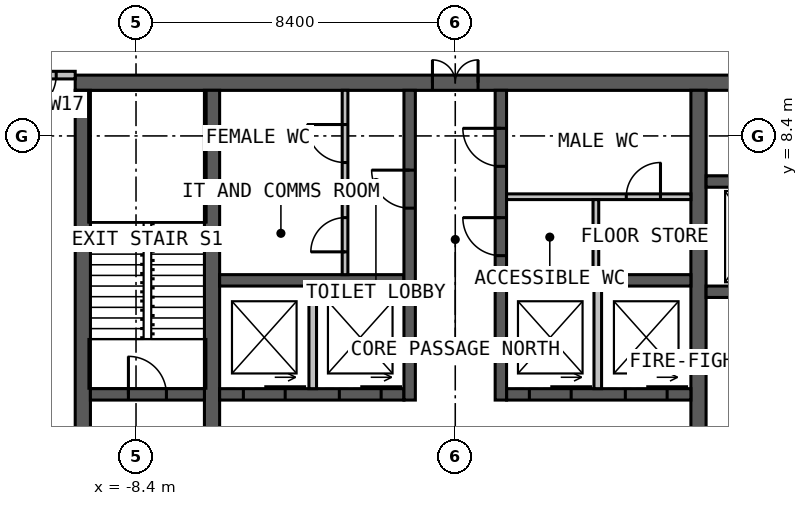
"""IFC4 building model, lengths in metres.
Left out: names, types, materials, properties, quantities, classifications, styles, units other than length and angle.
Written with IfcOpenShell. Run it as: python <this file> out.ifc"""

import sys

from ifc_helpers import new_model, si_unit, direction, frame, frame_2d, origin, place, context, subcontext, project, spatial, rectangle, extrude, element, fill, save


model = new_model("IFC4")
c1 = context("Model", 3, precision=1e-05, world=origin(), true_north=direction((0.0, 1.0)))
c2 = subcontext(c1, "Body", "Model", "MODEL_VIEW")
j1 = project(units=[si_unit("LENGTHUNIT", "METRE"), si_unit("PLANEANGLEUNIT", "RADIAN")], contexts=[c1])
p1 = place(None, origin())
s1 = spatial("IfcSite", under=j1, at=p1, CompositionType="ELEMENT")
p2 = place(p1, origin())
s2 = spatial("IfcBuilding", under=s1, at=p2, CompositionType="ELEMENT")
p3 = place(p2, frame((0.0, 0.0, 228.0)))
s3 = spatial("IfcBuildingStorey", under=s2, at=p3, CompositionType="ELEMENT", Elevation=228.0)
p4 = place(p3, frame((-10.0, 9.8, 0.0), z_axis=(0.0, 0.0, 1.0), x_axis=(1.0, 0.0, 0.0)))
e1 = element("IfcWall", 1, at=p4, inside=s3, PredefinedType="SOLIDWALL", context=c2, shape_type="SweptSolid", body=[
    extrude(rectangle(XDim=20.0, YDim=0.4, at=frame_2d((10.0, 0.0))), origin(), (0.0, 0.0, 1.0), 4.0),
])
p5 = place(p4, frame((9.4, 0.0, 0.0)))
e2 = element("IfcOpeningElement", 2, at=p5, cuts=e1, PredefinedType="OPENING", context=c2, shape_type="SweptSolid", body=[
    extrude(rectangle(XDim=1.2, YDim=2.2, at=frame_2d((0.6, 1.1))), frame((0.0, 0.21, 0.0), z_axis=(0.0, -1.0, 0.0), x_axis=(1.0, 0.0, 0.0)), (0.0, 0.0, 1.0), 0.42),
])
p6 = place(p3, frame((-9.8, 9.6, 0.0), z_axis=(0.0, 0.0, 1.0), x_axis=(0.0, -1.0, 0.0)))
e3 = element("IfcWall", 3, at=p6, inside=s3, PredefinedType="SOLIDWALL", context=c2, shape_type="SweptSolid", body=[
    extrude(rectangle(XDim=19.2, YDim=0.4, at=frame_2d((9.6, 0.0))), origin(), (0.0, 0.0, 1.0), 4.0),
])
p7 = place(p3, frame((-6.4, -9.6, 0.0), z_axis=(0.0, 0.0, 1.0), x_axis=(0.0, 1.0, 0.0)))
e4 = element("IfcWall", 4, at=p7, inside=s3, PredefinedType="SOLIDWALL", context=c2, shape_type="SweptSolid", body=[
    extrude(rectangle(XDim=19.2, YDim=0.4, at=frame_2d((9.6, 0.0))), origin(), (0.0, 0.0, 1.0), 4.0),
])
p8 = place(p7, frame((9.1, 0.0, 0.0)))
e5 = element("IfcOpeningElement", 5, at=p8, cuts=e4, PredefinedType="OPENING", context=c2, shape_type="SweptSolid", body=[
    extrude(rectangle(XDim=1.0, YDim=2.2, at=frame_2d((0.5, 1.1))), frame((0.0, 0.21, 0.0), z_axis=(0.0, -1.0, 0.0), x_axis=(1.0, 0.0, 0.0)), (0.0, 0.0, 1.0), 0.42),
])
p9 = place(p3, frame((6.4, 9.6, 0.0), z_axis=(0.0, 0.0, 1.0), x_axis=(0.0, -1.0, 0.0)))
e6 = element("IfcWall", 6, at=p9, inside=s3, PredefinedType="SOLIDWALL", context=c2, shape_type="SweptSolid", body=[
    extrude(rectangle(XDim=19.2, YDim=0.4, at=frame_2d((9.6, 0.0))), origin(), (0.0, 0.0, 1.0), 4.0),
])
p10 = place(p9, frame((9.1, 0.0, 0.0)))
e7 = element("IfcOpeningElement", 7, at=p10, cuts=e6, PredefinedType="OPENING", context=c2, shape_type="SweptSolid", body=[
    extrude(rectangle(XDim=1.0, YDim=2.2, at=frame_2d((0.5, 1.1))), frame((0.0, 0.21, 0.0), z_axis=(0.0, -1.0, 0.0), x_axis=(1.0, 0.0, 0.0)), (0.0, 0.0, 1.0), 0.42),
])
p11 = place(p3, frame((-6.2, 1.6, 0.0), z_axis=(0.0, 0.0, 1.0), x_axis=(1.0, 0.0, 0.0)))
e8 = element("IfcWall", 8, at=p11, inside=s3, PredefinedType="SOLIDWALL", context=c2, shape_type="SweptSolid", body=[
    extrude(rectangle(XDim=4.85, YDim=0.3, at=frame_2d((2.425, 0.0))), origin(), (0.0, 0.0, 1.0), 4.0),
])
p12 = place(p11, frame((0.625, 0.0, 0.0)))
e9 = element("IfcOpeningElement", 9, at=p12, cuts=e8, PredefinedType="OPENING", context=c2, shape_type="SweptSolid", body=[
    extrude(rectangle(XDim=1.1, YDim=2.2, at=frame_2d((0.55, 1.1))), frame((0.0, 0.16, 0.0), z_axis=(0.0, -1.0, 0.0), x_axis=(1.0, 0.0, 0.0)), (0.0, 0.0, 1.0), 0.32),
])
p13 = place(p11, frame((3.15, 0.0, 0.0)))
e10 = element("IfcOpeningElement", 10, at=p13, cuts=e8, PredefinedType="OPENING", context=c2, shape_type="SweptSolid", body=[
    extrude(rectangle(XDim=1.1, YDim=2.2, at=frame_2d((0.55, 1.1))), frame((0.0, 0.16, 0.0), z_axis=(0.0, -1.0, 0.0), x_axis=(1.0, 0.0, 0.0)), (0.0, 0.0, 1.0), 0.32),
])
p14 = place(p3, frame((1.35, 1.6, 0.0), z_axis=(0.0, 0.0, 1.0), x_axis=(1.0, 0.0, 0.0)))
e11 = element("IfcWall", 11, at=p14, inside=s3, PredefinedType="SOLIDWALL", context=c2, shape_type="SweptSolid", body=[
    extrude(rectangle(XDim=4.85, YDim=0.3, at=frame_2d((2.425, 0.0))), origin(), (0.0, 0.0, 1.0), 4.0),
])
p15 = place(p14, frame((0.6, 0.0, 0.0)))
e12 = element("IfcOpeningElement", 12, at=p15, cuts=e11, PredefinedType="OPENING", context=c2, shape_type="SweptSolid", body=[
    extrude(rectangle(XDim=1.1, YDim=2.2, at=frame_2d((0.55, 1.1))), frame((0.0, 0.16, 0.0), z_axis=(0.0, -1.0, 0.0), x_axis=(1.0, 0.0, 0.0)), (0.0, 0.0, 1.0), 0.32),
])
p16 = place(p14, frame((3.125, 0.0, 0.0)))
e13 = element("IfcOpeningElement", 13, at=p16, cuts=e11, PredefinedType="OPENING", context=c2, shape_type="SweptSolid", body=[
    extrude(rectangle(XDim=1.1, YDim=2.2, at=frame_2d((0.55, 1.1))), frame((0.0, 0.16, 0.0), z_axis=(0.0, -1.0, 0.0), x_axis=(1.0, 0.0, 0.0)), (0.0, 0.0, 1.0), 0.32),
])
for number, where, z_axis, x_axis in (
    (14, (-6.2, 4.6, 0.0), (0.0, 0.0, 1.0), (1.0, 0.0, 0.0)),
    (15, (1.35, 4.6, 0.0), (0.0, 0.0, 1.0), (1.0, 0.0, 0.0)),
):
    element("IfcWall", number, at=place(p3, frame(where, z_axis=z_axis, x_axis=x_axis)), inside=s3, PredefinedType="SOLIDWALL", context=c2, shape_type="SweptSolid", body=[
        extrude(rectangle(XDim=4.85, YDim=0.3, at=frame_2d((2.425, 0.0))), origin(), (0.0, 0.0, 1.0), 4.0),
    ])
p17 = place(p3, frame((-1.2, 1.45, 0.0), z_axis=(0.0, 0.0, 1.0), x_axis=(0.0, 1.0, 0.0)))
e16 = element("IfcWall", 16, at=p17, inside=s3, PredefinedType="SOLIDWALL", context=c2, shape_type="SweptSolid", body=[
    extrude(rectangle(XDim=8.15, YDim=0.3, at=frame_2d((4.075, 0.0))), origin(), (0.0, 0.0, 1.0), 4.0),
])
p18 = place(p17, frame((5.05, 0.0, 0.0)))
e17 = element("IfcOpeningElement", 17, at=p18, cuts=e16, PredefinedType="OPENING", context=c2, shape_type="SweptSolid", body=[
    extrude(rectangle(XDim=1.0, YDim=2.2, at=frame_2d((0.5, 1.1))), frame((0.0, 0.16, 0.0), z_axis=(0.0, -1.0, 0.0), x_axis=(1.0, 0.0, 0.0)), (0.0, 0.0, 1.0), 0.32),
])
p19 = place(p3, frame((1.2, 1.45, 0.0), z_axis=(0.0, 0.0, 1.0), x_axis=(0.0, 1.0, 0.0)))
e18 = element("IfcWall", 18, at=p19, inside=s3, PredefinedType="SOLIDWALL", context=c2, shape_type="SweptSolid", body=[
    extrude(rectangle(XDim=8.15, YDim=0.3, at=frame_2d((4.075, 0.0))), origin(), (0.0, 0.0, 1.0), 4.0),
])
p20 = place(p19, frame((3.8, 0.0, 0.0)))
e19 = element("IfcOpeningElement", 19, at=p20, cuts=e18, PredefinedType="OPENING", context=c2, shape_type="SweptSolid", body=[
    extrude(rectangle(XDim=1.0, YDim=2.2, at=frame_2d((0.5, 1.1))), frame((0.0, 0.16, 0.0), z_axis=(0.0, -1.0, 0.0), x_axis=(1.0, 0.0, 0.0)), (0.0, 0.0, 1.0), 0.32),
])
p21 = place(p19, frame((6.15, 0.0, 0.0)))
e20 = element("IfcOpeningElement", 20, at=p21, cuts=e18, PredefinedType="OPENING", context=c2, shape_type="SweptSolid", body=[
    extrude(rectangle(XDim=1.0, YDim=2.2, at=frame_2d((0.5, 1.1))), frame((0.0, 0.16, 0.0), z_axis=(0.0, -1.0, 0.0), x_axis=(1.0, 0.0, 0.0)), (0.0, 0.0, 1.0), 0.32),
])
p22 = place(p3, frame((-9.6, 1.6, 0.0), z_axis=(0.0, 0.0, 1.0), x_axis=(1.0, 0.0, 0.0)))
e21 = element("IfcWall", 21, at=p22, inside=s3, PredefinedType="SOLIDWALL", context=c2, shape_type="SweptSolid", body=[
    extrude(rectangle(XDim=3.0, YDim=0.3, at=frame_2d((1.5, 0.0))), origin(), (0.0, 0.0, 1.0), 4.0),
])
p23 = place(p22, frame((1.0, 0.0, 0.0)))
e22 = element("IfcOpeningElement", 22, at=p23, cuts=e21, PredefinedType="OPENING", context=c2, shape_type="SweptSolid", body=[
    extrude(rectangle(XDim=1.0, YDim=2.2, at=frame_2d((0.5, 1.1))), frame((0.0, 0.16, 0.0), z_axis=(0.0, -1.0, 0.0), x_axis=(1.0, 0.0, 0.0)), (0.0, 0.0, 1.0), 0.32),
])
p24 = place(p3, frame((6.6, 4.3, 0.0), z_axis=(0.0, 0.0, 1.0), x_axis=(1.0, 0.0, 0.0)))
e23 = element("IfcWall", 23, at=p24, inside=s3, PredefinedType="SOLIDWALL", context=c2, shape_type="SweptSolid", body=[
    extrude(rectangle(XDim=3.0, YDim=0.3, at=frame_2d((1.5, 0.0))), origin(), (0.0, 0.0, 1.0), 4.0),
])
p25 = place(p24, frame((0.75, 0.0, 0.0)))
e24 = element("IfcOpeningElement", 24, at=p25, cuts=e23, PredefinedType="OPENING", context=c2, shape_type="SweptSolid", body=[
    extrude(rectangle(XDim=1.1, YDim=2.2, at=frame_2d((0.55, 1.1))), frame((0.0, 0.16, 0.0), z_axis=(0.0, -1.0, 0.0), x_axis=(1.0, 0.0, 0.0)), (0.0, 0.0, 1.0), 0.32),
])
p26 = place(p3, frame((6.6, 7.2, 0.0), z_axis=(0.0, 0.0, 1.0), x_axis=(1.0, 0.0, 0.0)))
e25 = element("IfcWall", 25, at=p26, inside=s3, PredefinedType="SOLIDWALL", context=c2, shape_type="SweptSolid", body=[
    extrude(rectangle(XDim=3.0, YDim=0.3, at=frame_2d((1.5, 0.0))), origin(), (0.0, 0.0, 1.0), 4.0),
])
for number, where, z_axis, x_axis in (
    (26, (-3.75, 1.75, 0.0), (0.0, 0.0, 1.0), (0.0, 1.0, 0.0)),
    (27, (3.75, 1.75, 0.0), (0.0, 0.0, 1.0), (0.0, 1.0, 0.0)),
):
    element("IfcWall", number, at=place(p3, frame(where, z_axis=z_axis, x_axis=x_axis)), inside=s3, PredefinedType="SOLIDWALL", context=c2, shape_type="SweptSolid", body=[
        extrude(rectangle(XDim=2.7, YDim=0.2, at=frame_2d((1.35, 0.0))), origin(), (0.0, 0.0, 1.0), 3.75),
    ])
p27 = place(p3, frame((1.35, 6.8, 0.0), z_axis=(0.0, 0.0, 1.0), x_axis=(1.0, 0.0, 0.0)))
e28 = element("IfcWall", 28, at=p27, inside=s3, PredefinedType="PARTITIONING", context=c2, shape_type="SweptSolid", body=[
    extrude(rectangle(XDim=4.85, YDim=0.15, at=frame_2d((2.425, 0.0))), origin(), (0.0, 0.0, 1.0), 3.75),
])
p28 = place(p27, frame((3.15, 0.0, 0.0)))
e29 = element("IfcOpeningElement", 29, at=p28, cuts=e28, PredefinedType="OPENING", context=c2, shape_type="SweptSolid", body=[
    extrude(rectangle(XDim=0.9, YDim=2.2, at=frame_2d((0.45, 1.1))), frame((0.0, 0.085, 0.0), z_axis=(0.0, -1.0, 0.0), x_axis=(1.0, 0.0, 0.0)), (0.0, 0.0, 1.0), 0.17),
])
p29 = place(p3, frame((3.7, 4.75, 0.0), z_axis=(0.0, 0.0, 1.0), x_axis=(0.0, 1.0, 0.0)))
e30 = element("IfcWall", 30, at=p29, inside=s3, PredefinedType="PARTITIONING", context=c2, shape_type="SweptSolid", body=[
    extrude(rectangle(XDim=1.975, YDim=0.15, at=frame_2d((0.988, 0.0))), origin(), (0.0, 0.0, 1.0), 3.75),
])
p30 = place(p3, frame((-2.9, 4.75, 0.0), z_axis=(0.0, 0.0, 1.0), x_axis=(0.0, 1.0, 0.0)))
e31 = element("IfcWall", 31, at=p30, inside=s3, PredefinedType="PARTITIONING", context=c2, shape_type="SweptSolid", body=[
    extrude(rectangle(XDim=4.85, YDim=0.15, at=frame_2d((2.425, 0.0))), origin(), (0.0, 0.0, 1.0), 3.75),
])
p31 = place(p30, frame((2.95, 0.0, 0.0)))
e32 = element("IfcOpeningElement", 32, at=p31, cuts=e31, PredefinedType="OPENING", context=c2, shape_type="SweptSolid", body=[
    extrude(rectangle(XDim=1.0, YDim=2.2, at=frame_2d((0.5, 1.1))), frame((0.0, 0.085, 0.0), z_axis=(0.0, -1.0, 0.0), x_axis=(1.0, 0.0, 0.0)), (0.0, 0.0, 1.0), 0.17),
])
p32 = place(p30, frame((0.6, 0.0, 0.0)))
e33 = element("IfcOpeningElement", 33, at=p32, cuts=e31, PredefinedType="OPENING", context=c2, shape_type="SweptSolid", body=[
    extrude(rectangle(XDim=0.9, YDim=2.2, at=frame_2d((0.45, 1.1))), frame((0.0, 0.085, 0.0), z_axis=(0.0, -1.0, 0.0), x_axis=(1.0, 0.0, 0.0)), (0.0, 0.0, 1.0), 0.17),
])
p33 = place(p3, frame((-6.2, 7.0, 0.0), z_axis=(0.0, 0.0, 1.0), x_axis=(1.0, 0.0, 0.0)))
e34 = element("IfcWall", 34, at=p33, inside=s3, PredefinedType="PARTITIONING", context=c2, shape_type="SweptSolid", body=[
    extrude(rectangle(XDim=3.225, YDim=0.15, at=frame_2d((1.612, 0.0))), origin(), (0.0, 0.0, 1.0), 3.75),
])
p34 = place(p3, frame((-10.0, 10.0, 0.0), z_axis=(0.0, 0.0, 1.0), x_axis=(-1.0, 0.0, 0.0)))
e35 = element("IfcWall", 35, at=p34, inside=s3, PredefinedType="PARTITIONING", context=c2, shape_type="SweptSolid", body=[
    extrude(rectangle(XDim=2.0, YDim=0.2, at=frame_2d((1.0, 0.0))), origin(), (0.0, 0.0, 1.0), 3.8),
])
p35 = place(p34, frame((0.5, 0.0, 0.0)))
e36 = element("IfcOpeningElement", 36, at=p35, cuts=e35, PredefinedType="OPENING", context=c2, shape_type="SweptSolid", body=[
    extrude(rectangle(XDim=1.0, YDim=2.2, at=frame_2d((0.5, 1.1))), frame((0.0, 0.11, 0.0), z_axis=(0.0, -1.0, 0.0), x_axis=(1.0, 0.0, 0.0)), (0.0, 0.0, 1.0), 0.22),
])
p36 = place(p5, origin())
e37 = element("IfcDoor", 37, at=p36, inside=s3, OperationType="DOUBLE_DOOR_SINGLE_SWING", PredefinedType="DOOR", context=c2, shape_type="SweptSolid", body=[
    extrude(rectangle(XDim=1.2, YDim=2.2, at=frame_2d((0.6, 1.1))), frame((0.0, 0.025, 0.0), z_axis=(0.0, -1.0, 0.0), x_axis=(1.0, 0.0, 0.0)), (0.0, 0.0, 1.0), 0.05),
])
fill(e2, e37)
p37 = place(p23, origin())
e38 = element("IfcDoor", 38, at=p37, inside=s3, OperationType="SINGLE_SWING_LEFT", PredefinedType="DOOR", context=c2, shape_type="SweptSolid", body=[
    extrude(rectangle(XDim=1.0, YDim=2.2, at=frame_2d((0.5, 1.1))), frame((0.0, 0.025, 0.0), z_axis=(0.0, -1.0, 0.0), x_axis=(1.0, 0.0, 0.0)), (0.0, 0.0, 1.0), 0.05),
])
fill(e22, e38)
p38 = place(p18, origin())
e39 = element("IfcDoor", 39, at=p38, inside=s3, OperationType="SINGLE_SWING_RIGHT", PredefinedType="DOOR", context=c2, shape_type="SweptSolid", body=[
    extrude(rectangle(XDim=1.0, YDim=2.2, at=frame_2d((0.5, 1.1))), frame((0.0, 0.025, 0.0), z_axis=(0.0, -1.0, 0.0), x_axis=(1.0, 0.0, 0.0)), (0.0, 0.0, 1.0), 0.05),
])
fill(e17, e39)
p39 = place(p20, origin())
e40 = element("IfcDoor", 40, at=p39, inside=s3, OperationType="SINGLE_SWING_RIGHT", PredefinedType="DOOR", context=c2, shape_type="SweptSolid", body=[
    extrude(rectangle(XDim=1.0, YDim=2.2, at=frame_2d((0.5, 1.1))), frame((0.0, 0.025, 0.0), z_axis=(0.0, -1.0, 0.0), x_axis=(1.0, 0.0, 0.0)), (0.0, 0.0, 1.0), 0.05),
])
fill(e19, e40)
p40 = place(p21, origin())
e41 = element("IfcDoor", 41, at=p40, inside=s3, OperationType="SINGLE_SWING_RIGHT", PredefinedType="DOOR", context=c2, shape_type="SweptSolid", body=[
    extrude(rectangle(XDim=1.0, YDim=2.2, at=frame_2d((0.5, 1.1))), frame((0.0, 0.025, 0.0), z_axis=(0.0, -1.0, 0.0), x_axis=(1.0, 0.0, 0.0)), (0.0, 0.0, 1.0), 0.05),
])
fill(e20, e41)
p41 = place(p28, origin())
e42 = element("IfcDoor", 42, at=p41, inside=s3, OperationType="SINGLE_SWING_RIGHT", PredefinedType="DOOR", context=c2, shape_type="SweptSolid", body=[
    extrude(rectangle(XDim=0.9, YDim=2.2, at=frame_2d((0.45, 1.1))), frame((0.0, 0.025, 0.0), z_axis=(0.0, -1.0, 0.0), x_axis=(1.0, 0.0, 0.0)), (0.0, 0.0, 1.0), 0.05),
])
fill(e29, e42)
p42 = place(p31, origin())
e43 = element("IfcDoor", 43, at=p42, inside=s3, OperationType="SINGLE_SWING_RIGHT", PredefinedType="DOOR", context=c2, shape_type="SweptSolid", body=[
    extrude(rectangle(XDim=1.0, YDim=2.2, at=frame_2d((0.5, 1.1))), frame((0.0, 0.025, 0.0), z_axis=(0.0, -1.0, 0.0), x_axis=(1.0, 0.0, 0.0)), (0.0, 0.0, 1.0), 0.05),
])
fill(e32, e43)
p43 = place(p32, origin())
e44 = element("IfcDoor", 44, at=p43, inside=s3, OperationType="SINGLE_SWING_LEFT", PredefinedType="DOOR", context=c2, shape_type="SweptSolid", body=[
    extrude(rectangle(XDim=0.9, YDim=2.2, at=frame_2d((0.45, 1.1))), frame((0.0, 0.025, 0.0), z_axis=(0.0, -1.0, 0.0), x_axis=(1.0, 0.0, 0.0)), (0.0, 0.0, 1.0), 0.05),
])
fill(e33, e44)
p44 = place(p12, origin())
e45 = element("IfcDoor", 45, at=p44, inside=s3, OperationType="SLIDING_TO_LEFT", PredefinedType="DOOR", context=c2, shape_type="SweptSolid", body=[
    extrude(rectangle(XDim=1.1, YDim=2.2, at=frame_2d((0.55, 1.1))), frame((0.0, 0.025, 0.0), z_axis=(0.0, -1.0, 0.0), x_axis=(1.0, 0.0, 0.0)), (0.0, 0.0, 1.0), 0.05),
])
fill(e9, e45)
p45 = place(p13, origin())
e46 = element("IfcDoor", 46, at=p45, inside=s3, OperationType="SLIDING_TO_LEFT", PredefinedType="DOOR", context=c2, shape_type="SweptSolid", body=[
    extrude(rectangle(XDim=1.1, YDim=2.2, at=frame_2d((0.55, 1.1))), frame((0.0, 0.025, 0.0), z_axis=(0.0, -1.0, 0.0), x_axis=(1.0, 0.0, 0.0)), (0.0, 0.0, 1.0), 0.05),
])
fill(e10, e46)
p46 = place(p15, origin())
e47 = element("IfcDoor", 47, at=p46, inside=s3, OperationType="SLIDING_TO_LEFT", PredefinedType="DOOR", context=c2, shape_type="SweptSolid", body=[
    extrude(rectangle(XDim=1.1, YDim=2.2, at=frame_2d((0.55, 1.1))), frame((0.0, 0.025, 0.0), z_axis=(0.0, -1.0, 0.0), x_axis=(1.0, 0.0, 0.0)), (0.0, 0.0, 1.0), 0.05),
])
fill(e12, e47)
p47 = place(p16, origin())
e48 = element("IfcDoor", 48, at=p47, inside=s3, OperationType="SLIDING_TO_LEFT", PredefinedType="DOOR", context=c2, shape_type="SweptSolid", body=[
    extrude(rectangle(XDim=1.1, YDim=2.2, at=frame_2d((0.55, 1.1))), frame((0.0, 0.025, 0.0), z_axis=(0.0, -1.0, 0.0), x_axis=(1.0, 0.0, 0.0)), (0.0, 0.0, 1.0), 0.05),
])
fill(e13, e48)
p48 = place(p35, origin())
e49 = element("IfcDoor", 49, at=p48, inside=s3, OperationType="SINGLE_SWING_RIGHT", PredefinedType="DOOR", context=c2, shape_type="SweptSolid", body=[
    extrude(rectangle(XDim=1.0, YDim=2.2, at=frame_2d((0.5, 1.1))), frame((0.0, 0.025, 0.0), z_axis=(0.0, -1.0, 0.0), x_axis=(1.0, 0.0, 0.0)), (0.0, 0.0, 1.0), 0.05),
])
fill(e36, e49)
save(model, sys.argv[1])
